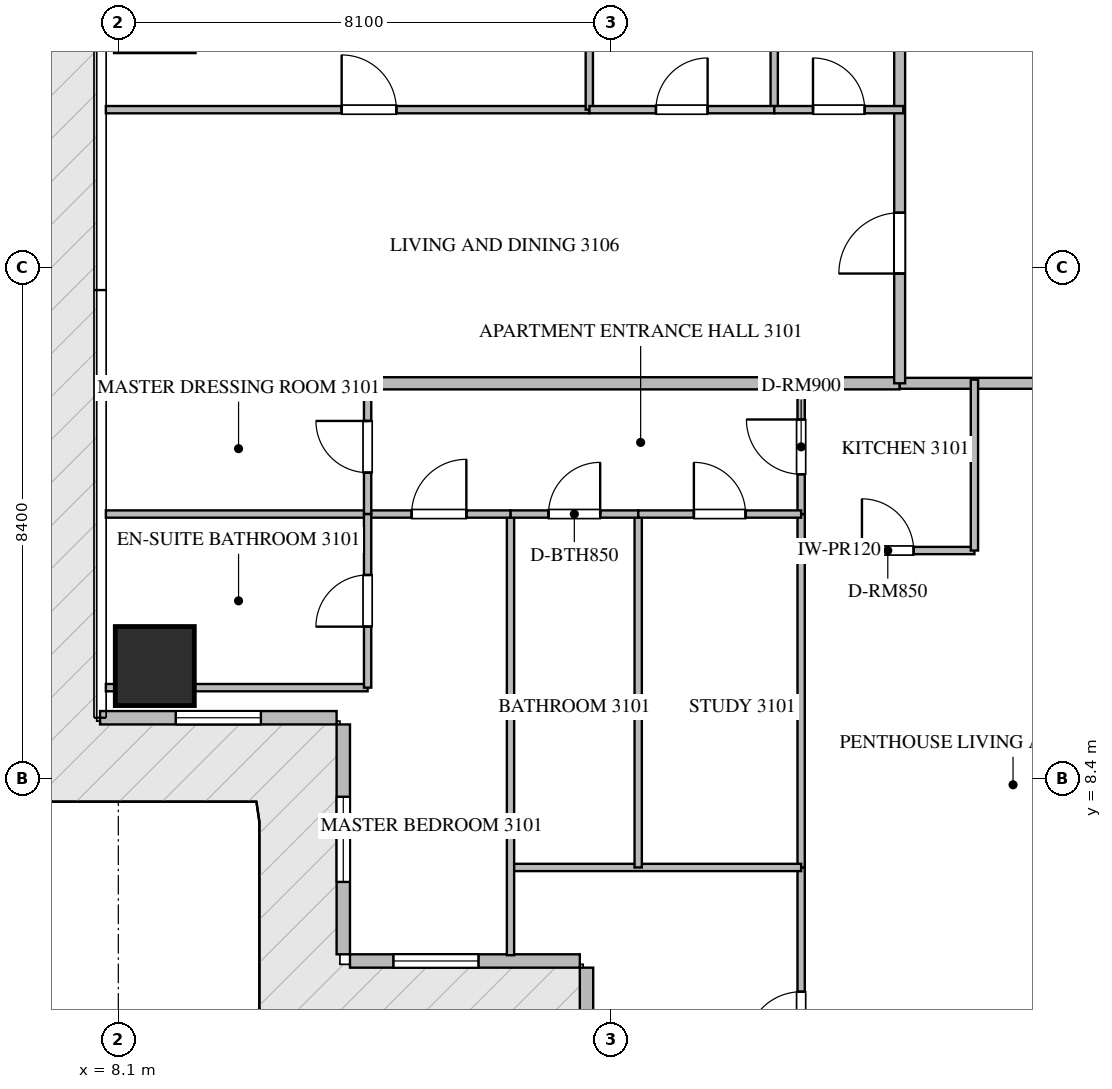
"""IFC4 building model, lengths in metres.
Left out: names, types, materials, properties, quantities, classifications, styles, units other than length and angle.
Written with IfcOpenShell. Run it as: python <this file> out.ifc"""

import sys

from ifc_helpers import new_model, si_unit, direction, frame, frame_2d, origin, origin_2d, place, context, subcontext, project, spatial, rectangle, extrude, source, transform, mapped, element, fill, save


model = new_model("IFC4")
c1 = context("Model", 3, precision=1e-05, world=origin(), true_north=direction((0.0, 1.0)))
c2 = subcontext(c1, "Body", "Model", "MODEL_VIEW")
j1 = project(units=[si_unit("LENGTHUNIT", "METRE"), si_unit("PLANEANGLEUNIT", "RADIAN")], contexts=[c1])
p1 = place(None, origin())
s1 = spatial("IfcSite", under=j1, at=p1, CompositionType="ELEMENT")
p2 = place(p1, origin())
s2 = spatial("IfcBuilding", under=s1, at=p2, CompositionType="ELEMENT")
p3 = place(p2, frame((0.0, 0.0, 127.65)))
s3 = spatial("IfcBuildingStorey", under=s2, at=p3, CompositionType="ELEMENT", Elevation=127.65)
m1 = source(origin(), c2, "Body", "SweptSolid", [
    extrude(rectangle(XDim=1.3, YDim=1.3, at=origin_2d()), origin(), (0.0, 0.0, 1.0), 3.75),
])
p4 = place(p3, frame((8.7, 10.25, -0.26), z_axis=(0.0, 0.0, 1.0), x_axis=(1.0, 0.0, 0.0)))
e1 = element("IfcColumn", 1, at=p4, inside=s3, PredefinedType="COLUMN", context=c2, shape_type="MappedRepresentation", body=[
    mapped(m1, transform((0.0, 0.0, 0.0), scale=1.0)),
])
p5 = place(p3, frame((7.8, 9.4, 0.0), z_axis=(0.0, 0.0, 1.0), x_axis=(1.0, 0.0, 0.0)))
e2 = element("IfcWall", 2, at=p5, inside=s3, PredefinedType="ELEMENTEDWALL", context=c2, shape_type="SweptSolid", body=[
    extrude(rectangle(XDim=3.89, YDim=0.22, at=frame_2d((1.945, 0.0))), origin(), (0.0, 0.0, 1.0), 3.475),
])
p6 = place(p5, frame((1.245, 0.0, 0.65)))
e3 = element("IfcOpeningElement", 3, at=p6, cuts=e2, PredefinedType="OPENING", context=c2, shape_type="SweptSolid", body=[
    extrude(rectangle(XDim=1.4, YDim=2.05, at=frame_2d((0.7, 1.025))), frame((0.0, 0.12, 0.0), z_axis=(0.0, -1.0, 0.0), x_axis=(1.0, 0.0, 0.0)), (0.0, 0.0, 1.0), 0.24),
])
p7 = place(p3, frame((11.8, 9.29, 0.0), z_axis=(0.0, 0.0, 1.0), x_axis=(0.0, -1.0, 0.0)))
e4 = element("IfcWall", 4, at=p7, inside=s3, PredefinedType="ELEMENTEDWALL", context=c2, shape_type="SweptSolid", body=[
    extrude(rectangle(XDim=3.78, YDim=0.22, at=frame_2d((1.89, 0.0))), origin(), (0.0, 0.0, 1.0), 3.475),
])
p8 = place(p7, frame((1.19, 0.0, 0.65)))
e5 = element("IfcOpeningElement", 5, at=p8, cuts=e4, PredefinedType="OPENING", context=c2, shape_type="SweptSolid", body=[
    extrude(rectangle(XDim=1.4, YDim=2.05, at=frame_2d((0.7, 1.025))), frame((0.0, 0.12, 0.0), z_axis=(0.0, -1.0, 0.0), x_axis=(1.0, 0.0, 0.0)), (0.0, 0.0, 1.0), 0.24),
])
p9 = place(p3, frame((11.91, 5.4, 0.0), z_axis=(0.0, 0.0, 1.0), x_axis=(1.0, 0.0, 0.0)))
e6 = element("IfcWall", 6, at=p9, inside=s3, PredefinedType="ELEMENTEDWALL", context=c2, shape_type="SweptSolid", body=[
    extrude(rectangle(XDim=3.78, YDim=0.22, at=frame_2d((1.89, 0.0))), origin(), (0.0, 0.0, 1.0), 3.475),
])
p10 = place(p9, frame((0.714, 0.0, 0.65)))
e7 = element("IfcOpeningElement", 7, at=p10, cuts=e6, PredefinedType="OPENING", context=c2, shape_type="SweptSolid", body=[
    extrude(rectangle(XDim=1.4, YDim=2.05, at=frame_2d((0.7, 1.025))), frame((0.0, 0.12, 0.0), z_axis=(0.0, -1.0, 0.0), x_axis=(1.0, 0.0, 0.0)), (0.0, 0.0, 1.0), 0.24),
])
p11 = place(p3, frame((15.8, 5.29, 0.0), z_axis=(0.0, 0.0, 1.0), x_axis=(0.0, -1.0, 0.0)))
e8 = element("IfcWall", 8, at=p11, inside=s3, PredefinedType="ELEMENTEDWALL", context=c2, shape_type="SweptSolid", body=[
    extrude(rectangle(XDim=3.89, YDim=0.22, at=frame_2d((1.945, 0.0))), origin(), (0.0, 0.0, 1.0), 3.475),
])
p12 = place(p11, frame((1.245, 0.0, 0.65)))
e9 = element("IfcOpeningElement", 9, at=p12, cuts=e8, PredefinedType="OPENING", context=c2, shape_type="SweptSolid", body=[
    extrude(rectangle(XDim=1.4, YDim=2.05, at=frame_2d((0.7, 1.025))), frame((0.0, 0.12, 0.0), z_axis=(0.0, -1.0, 0.0), x_axis=(1.0, 0.0, 0.0)), (0.0, 0.0, 1.0), 0.24),
])
p13 = place(p3, frame((7.882, 14.9, 0.0), z_axis=(0.0, 0.0, 1.0), x_axis=(1.0, 0.0, 0.0)))
e10 = element("IfcWall", 10, at=p13, inside=s3, PredefinedType="PARTITIONING", context=c2, shape_type="SweptSolid", body=[
    extrude(rectangle(XDim=13.068, YDim=0.2, at=frame_2d((6.534, 0.0))), origin(), (0.0, 0.0, 1.0), 3.49),
])
p14 = place(p3, frame((20.952, 14.9, 0.0), z_axis=(0.0, 0.0, 1.0), x_axis=(1.0, 0.0, 0.0)))
e11 = element("IfcWall", 11, at=p14, inside=s3, PredefinedType="PARTITIONING", context=c2, shape_type="SweptSolid", body=[
    extrude(rectangle(XDim=22.896, YDim=0.18, at=frame_2d((11.448, 0.0))), origin(), (0.0, 0.0, 1.0), 3.49),
])
p15 = place(p14, frame((2.781, 0.0, 0.0)))
e12 = element("IfcOpeningElement", 12, at=p15, cuts=e11, PredefinedType="OPENING", context=c2, shape_type="SweptSolid", body=[
    extrude(rectangle(XDim=1.0, YDim=2.15, at=frame_2d((0.5, 1.075))), frame((0.0, 0.1, 0.0), z_axis=(0.0, -1.0, 0.0), x_axis=(1.0, 0.0, 0.0)), (0.0, 0.0, 1.0), 0.2),
])
p16 = place(p14, frame((7.16, 0.0, 0.0)))
e13 = element("IfcOpeningElement", 13, at=p16, cuts=e11, PredefinedType="OPENING", context=c2, shape_type="SweptSolid", body=[
    extrude(rectangle(XDim=1.0, YDim=2.15, at=frame_2d((0.5, 1.075))), frame((0.0, 0.1, 0.0), z_axis=(0.0, -1.0, 0.0), x_axis=(1.0, 0.0, 0.0)), (0.0, 0.0, 1.0), 0.2),
])
p17 = place(p14, frame((19.115, 0.0, 0.0)))
e14 = element("IfcOpeningElement", 14, at=p17, cuts=e11, PredefinedType="OPENING", context=c2, shape_type="SweptSolid", body=[
    extrude(rectangle(XDim=1.0, YDim=2.15, at=frame_2d((0.5, 1.075))), frame((0.0, 0.1, 0.0), z_axis=(0.0, -1.0, 0.0), x_axis=(1.0, 0.0, 0.0)), (0.0, 0.0, 1.0), 0.2),
])
p18 = place(p3, frame((20.95, 14.9, 0.0), z_axis=(0.0, 0.0, 1.0), x_axis=(0.0, 1.0, 0.0)))
e15 = element("IfcWall", 15, at=p18, inside=s3, PredefinedType="PARTITIONING", context=c2, shape_type="SweptSolid", body=[
    extrude(rectangle(XDim=18.7, YDim=0.18, at=frame_2d((9.35, 0.0))), origin(), (0.0, 0.0, 1.0), 3.49),
])
p19 = place(p18, frame((1.805, 0.0, 0.0)))
e16 = element("IfcOpeningElement", 16, at=p19, cuts=e15, PredefinedType="OPENING", context=c2, shape_type="SweptSolid", body=[
    extrude(rectangle(XDim=1.0, YDim=2.15, at=frame_2d((0.5, 1.075))), frame((0.0, 0.1, 0.0), z_axis=(0.0, -1.0, 0.0), x_axis=(1.0, 0.0, 0.0)), (0.0, 0.0, 1.0), 0.2),
])
p20 = place(p18, frame((10.602, 0.0, 0.0)))
e17 = element("IfcOpeningElement", 17, at=p20, cuts=e15, PredefinedType="OPENING", context=c2, shape_type="SweptSolid", body=[
    extrude(rectangle(XDim=1.0, YDim=2.15, at=frame_2d((0.5, 1.075))), frame((0.0, 0.1, 0.0), z_axis=(0.0, -1.0, 0.0), x_axis=(1.0, 0.0, 0.0)), (0.0, 0.0, 1.0), 0.2),
])
p21 = place(p3, frame((19.33, 12.15, 0.0), z_axis=(0.0, 0.0, 1.0), x_axis=(1.0, 0.0, 0.0)))
e18 = element("IfcWall", 18, at=p21, inside=s3, PredefinedType="PARTITIONING", context=c2, shape_type="SweptSolid", body=[
    extrude(rectangle(XDim=2.85, YDim=0.12, at=frame_2d((1.425, 0.0))), origin(), (0.0, 0.0, 1.0), 3.49),
])
p22 = place(p21, frame((1.0, 0.0, 0.0)))
e19 = element("IfcOpeningElement", 19, at=p22, cuts=e18, PredefinedType="OPENING", context=c2, shape_type="SweptSolid", body=[
    extrude(rectangle(XDim=0.85, YDim=2.1, at=frame_2d((0.425, 1.05))), frame((0.0, 0.07, 0.0), z_axis=(0.0, -1.0, 0.0), x_axis=(1.0, 0.0, 0.0)), (0.0, 0.0, 1.0), 0.14),
])
p23 = place(p3, frame((22.18, 12.15, 0.0), z_axis=(0.0, 0.0, 1.0), x_axis=(0.0, 1.0, 0.0)))
e20 = element("IfcWall", 20, at=p23, inside=s3, PredefinedType="PARTITIONING", context=c2, shape_type="SweptSolid", body=[
    extrude(rectangle(XDim=2.81, YDim=0.12, at=frame_2d((1.405, 0.0))), origin(), (0.0, 0.0, 1.0), 3.49),
])
p24 = place(p3, frame((19.33, 12.75, 0.0), z_axis=(0.0, 0.0, 1.0), x_axis=(0.0, 1.0, 0.0)))
e21 = element("IfcWall", 21, at=p24, inside=s3, PredefinedType="PARTITIONING", context=c2, shape_type="SweptSolid", body=[
    extrude(rectangle(XDim=2.21, YDim=0.12, at=frame_2d((1.105, 0.0))), origin(), (0.0, 0.0, 1.0), 3.49),
])
p25 = place(p24, frame((0.655, 0.0, 0.0)))
e22 = element("IfcOpeningElement", 22, at=p25, cuts=e21, PredefinedType="OPENING", context=c2, shape_type="SweptSolid", body=[
    extrude(rectangle(XDim=0.9, YDim=2.1, at=frame_2d((0.45, 1.05))), frame((0.0, 0.07, 0.0), z_axis=(0.0, -1.0, 0.0), x_axis=(1.0, 0.0, 0.0)), (0.0, 0.0, 1.0), 0.14),
])
p26 = place(p3, frame((19.33, 1.495, 0.0), z_axis=(0.0, 0.0, 1.0), x_axis=(0.0, 1.0, 0.0)))
e23 = element("IfcWall", 23, at=p26, inside=s3, PredefinedType="PARTITIONING", context=c2, shape_type="SweptSolid", body=[
    extrude(rectangle(XDim=5.443, YDim=0.12, at=frame_2d((2.721, 0.0))), origin(), (0.0, 0.0, 1.0), 3.49),
])
p27 = place(p26, frame((2.499, 0.0, 0.0)))
e24 = element("IfcOpeningElement", 24, at=p27, cuts=e23, PredefinedType="OPENING", context=c2, shape_type="SweptSolid", body=[
    extrude(rectangle(XDim=0.9, YDim=2.1, at=frame_2d((0.45, 1.05))), frame((0.0, 0.07, 0.0), z_axis=(0.0, -1.0, 0.0), x_axis=(1.0, 0.0, 0.0)), (0.0, 0.0, 1.0), 0.14),
])
p28 = place(p3, frame((19.33, 6.94, 0.0), z_axis=(0.0, 0.0, 1.0), x_axis=(0.0, 1.0, 0.0)))
e25 = element("IfcWall", 25, at=p28, inside=s3, PredefinedType="PARTITIONING", context=c2, shape_type="SweptSolid", body=[
    extrude(rectangle(XDim=5.808, YDim=0.12, at=frame_2d((2.904, 0.0))), origin(), (0.0, 0.0, 1.0), 3.49),
])
p29 = place(p3, frame((14.55, 6.938, 0.0), z_axis=(0.0, 0.0, 1.0), x_axis=(1.0, 0.0, 0.0)))
e26 = element("IfcWall", 26, at=p29, inside=s3, PredefinedType="PARTITIONING", context=c2, shape_type="SweptSolid", body=[
    extrude(rectangle(XDim=4.78, YDim=0.12, at=frame_2d((2.39, 0.0))), origin(), (0.0, 0.0, 1.0), 3.49),
])
p30 = place(p3, frame((14.55, 5.495, 0.0), z_axis=(0.0, 0.0, 1.0), x_axis=(0.0, 1.0, 0.0)))
e27 = element("IfcWall", 27, at=p30, inside=s3, PredefinedType="PARTITIONING", context=c2, shape_type="SweptSolid", body=[
    extrude(rectangle(XDim=7.255, YDim=0.12, at=frame_2d((3.627, 0.0))), origin(), (0.0, 0.0, 1.0), 3.49),
])
p31 = place(p3, frame((16.65, 6.938, 0.0), z_axis=(0.0, 0.0, 1.0), x_axis=(0.0, 1.0, 0.0)))
e28 = element("IfcWall", 28, at=p31, inside=s3, PredefinedType="PARTITIONING", context=c2, shape_type="SweptSolid", body=[
    extrude(rectangle(XDim=5.812, YDim=0.12, at=frame_2d((2.906, 0.0))), origin(), (0.0, 0.0, 1.0), 2.972),
])
p32 = place(p3, frame((14.55, 12.75, 0.0), z_axis=(0.0, 0.0, 1.0), x_axis=(1.0, 0.0, 0.0)))
e29 = element("IfcWall", 29, at=p32, inside=s3, PredefinedType="PARTITIONING", context=c2, shape_type="SweptSolid", body=[
    extrude(rectangle(XDim=2.1, YDim=0.12, at=frame_2d((1.05, 0.0))), origin(), (0.0, 0.0, 1.0), 3.49),
])
p33 = place(p32, frame((0.625, 0.0, 0.0)))
e30 = element("IfcOpeningElement", 30, at=p33, cuts=e29, PredefinedType="OPENING", context=c2, shape_type="SweptSolid", body=[
    extrude(rectangle(XDim=0.85, YDim=2.1, at=frame_2d((0.425, 1.05))), frame((0.0, 0.07, 0.0), z_axis=(0.0, -1.0, 0.0), x_axis=(1.0, 0.0, 0.0)), (0.0, 0.0, 1.0), 0.14),
])
p34 = place(p3, frame((16.652, 12.75, 0.0), z_axis=(0.0, 0.0, 1.0), x_axis=(1.0, 0.0, 0.0)))
e31 = element("IfcWall", 31, at=p34, inside=s3, PredefinedType="PARTITIONING", context=c2, shape_type="SweptSolid", body=[
    extrude(rectangle(XDim=2.678, YDim=0.12, at=frame_2d((1.339, 0.0))), origin(), (0.0, 0.0, 1.0), 3.49),
])
p35 = place(p34, frame((0.914, 0.0, 0.0)))
e32 = element("IfcOpeningElement", 32, at=p35, cuts=e31, PredefinedType="OPENING", context=c2, shape_type="SweptSolid", body=[
    extrude(rectangle(XDim=0.85, YDim=2.1, at=frame_2d((0.425, 1.05))), frame((0.0, 0.07, 0.0), z_axis=(0.0, -1.0, 0.0), x_axis=(1.0, 0.0, 0.0)), (0.0, 0.0, 1.0), 0.14),
])
p36 = place(p3, frame((12.2, 12.75, 0.0), z_axis=(0.0, 0.0, 1.0), x_axis=(1.0, 0.0, 0.0)))
e33 = element("IfcWall", 33, at=p36, inside=s3, PredefinedType="PARTITIONING", context=c2, shape_type="SweptSolid", body=[
    extrude(rectangle(XDim=2.348, YDim=0.12, at=frame_2d((1.174, 0.0))), origin(), (0.0, 0.0, 1.0), 3.49),
])
p37 = place(p36, frame((0.724, 0.0, 0.0)))
e34 = element("IfcOpeningElement", 34, at=p37, cuts=e33, PredefinedType="OPENING", context=c2, shape_type="SweptSolid", body=[
    extrude(rectangle(XDim=0.9, YDim=2.1, at=frame_2d((0.45, 1.05))), frame((0.0, 0.07, 0.0), z_axis=(0.0, -1.0, 0.0), x_axis=(1.0, 0.0, 0.0)), (0.0, 0.0, 1.0), 0.14),
])
p38 = place(p3, frame((7.895, 9.895, 0.0), z_axis=(0.0, 0.0, 1.0), x_axis=(1.0, 0.0, 0.0)))
e35 = element("IfcWall", 35, at=p38, inside=s3, PredefinedType="PARTITIONING", context=c2, shape_type="SweptSolid", body=[
    extrude(rectangle(XDim=4.305, YDim=0.12, at=frame_2d((2.152, 0.0))), origin(), (0.0, 0.0, 1.0), 3.49),
])
p39 = place(p3, frame((7.895, 12.75, 0.0), z_axis=(0.0, 0.0, 1.0), x_axis=(1.0, 0.0, 0.0)))
e36 = element("IfcWall", 36, at=p39, inside=s3, PredefinedType="PARTITIONING", context=c2, shape_type="SweptSolid", body=[
    extrude(rectangle(XDim=4.303, YDim=0.12, at=frame_2d((2.151, 0.0))), origin(), (0.0, 0.0, 1.0), 3.49),
])
p40 = place(p3, frame((12.2, 9.895, 0.0), z_axis=(0.0, 0.0, 1.0), x_axis=(0.0, 1.0, 0.0)))
e37 = element("IfcWall", 37, at=p40, inside=s3, PredefinedType="PARTITIONING", context=c2, shape_type="SweptSolid", body=[
    extrude(rectangle(XDim=2.855, YDim=0.12, at=frame_2d((1.427, 0.0))), origin(), (0.0, 0.0, 1.0), 3.49),
])
p41 = place(p40, frame((1.003, 0.0, 0.0)))
e38 = element("IfcOpeningElement", 38, at=p41, cuts=e37, PredefinedType="OPENING", context=c2, shape_type="SweptSolid", body=[
    extrude(rectangle(XDim=0.85, YDim=2.1, at=frame_2d((0.425, 1.05))), frame((0.0, 0.07, 0.0), z_axis=(0.0, -1.0, 0.0), x_axis=(1.0, 0.0, 0.0)), (0.0, 0.0, 1.0), 0.14),
])
p42 = place(p3, frame((12.2, 12.752, 0.0), z_axis=(0.0, 0.0, 1.0), x_axis=(0.0, 1.0, 0.0)))
e39 = element("IfcWall", 39, at=p42, inside=s3, PredefinedType="PARTITIONING", context=c2, shape_type="SweptSolid", body=[
    extrude(rectangle(XDim=2.208, YDim=0.12, at=frame_2d((1.104, 0.0))), origin(), (0.0, 0.0, 1.0), 3.49),
])
p43 = place(p42, frame((0.679, 0.0, 0.0)))
e40 = element("IfcOpeningElement", 40, at=p43, cuts=e39, PredefinedType="OPENING", context=c2, shape_type="SweptSolid", body=[
    extrude(rectangle(XDim=0.85, YDim=2.1, at=frame_2d((0.425, 1.05))), frame((0.0, 0.07, 0.0), z_axis=(0.0, -1.0, 0.0), x_axis=(1.0, 0.0, 0.0)), (0.0, 0.0, 1.0), 0.14),
])
p44 = place(p3, frame((7.895, 19.4, 0.0), z_axis=(0.0, 0.0, 1.0), x_axis=(1.0, 0.0, 0.0)))
e41 = element("IfcWall", 41, at=p44, inside=s3, PredefinedType="PARTITIONING", context=c2, shape_type="SweptSolid", body=[
    extrude(rectangle(XDim=7.951, YDim=0.12, at=frame_2d((3.976, 0.0))), origin(), (0.0, 0.0, 1.0), 3.49),
])
p45 = place(p44, frame((3.878, 0.0, 0.0)))
e42 = element("IfcOpeningElement", 42, at=p45, cuts=e41, PredefinedType="OPENING", context=c2, shape_type="SweptSolid", body=[
    extrude(rectangle(XDim=0.9, YDim=2.1, at=frame_2d((0.45, 1.05))), frame((0.0, 0.07, 0.0), z_axis=(0.0, -1.0, 0.0), x_axis=(1.0, 0.0, 0.0)), (0.0, 0.0, 1.0), 0.14),
])
for number, where, z_axis, x_axis in (
    (43, (15.846, 19.4, 0.0), (0.0, 0.0, 1.0), (0.0, 1.0, 0.0)),
    (44, (18.887, 19.4, 0.0), (0.0, 0.0, 1.0), (0.0, 1.0, 0.0)),
):
    element("IfcWall", number, at=place(p3, frame(where, z_axis=z_axis, x_axis=x_axis)), inside=s3, PredefinedType="PARTITIONING", context=c2, shape_type="SweptSolid", body=[
        extrude(rectangle(XDim=4.86, YDim=0.12, at=frame_2d((2.43, 0.0))), origin(), (0.0, 0.0, 1.0), 3.49),
    ])
p46 = place(p3, frame((15.848, 19.4, 0.0), z_axis=(0.0, 0.0, 1.0), x_axis=(1.0, 0.0, 0.0)))
e45 = element("IfcWall", 45, at=p46, inside=s3, PredefinedType="PARTITIONING", context=c2, shape_type="SweptSolid", body=[
    extrude(rectangle(XDim=3.039, YDim=0.12, at=frame_2d((1.52, 0.0))), origin(), (0.0, 0.0, 1.0), 3.49),
])
p47 = place(p46, frame((1.094, 0.0, 0.0)))
e46 = element("IfcOpeningElement", 46, at=p47, cuts=e45, PredefinedType="OPENING", context=c2, shape_type="SweptSolid", body=[
    extrude(rectangle(XDim=0.85, YDim=2.1, at=frame_2d((0.425, 1.05))), frame((0.0, 0.07, 0.0), z_axis=(0.0, -1.0, 0.0), x_axis=(1.0, 0.0, 0.0)), (0.0, 0.0, 1.0), 0.14),
])
p48 = place(p3, frame((18.889, 19.4, 0.0), z_axis=(0.0, 0.0, 1.0), x_axis=(1.0, 0.0, 0.0)))
e47 = element("IfcWall", 47, at=p48, inside=s3, PredefinedType="PARTITIONING", context=c2, shape_type="SweptSolid", body=[
    extrude(rectangle(XDim=2.121, YDim=0.12, at=frame_2d((1.061, 0.0))), origin(), (0.0, 0.0, 1.0), 3.49),
])
p49 = place(p48, frame((0.636, 0.0, 0.0)))
e48 = element("IfcOpeningElement", 48, at=p49, cuts=e47, PredefinedType="OPENING", context=c2, shape_type="SweptSolid", body=[
    extrude(rectangle(XDim=0.85, YDim=2.1, at=frame_2d((0.425, 1.05))), frame((0.0, 0.07, 0.0), z_axis=(0.0, -1.0, 0.0), x_axis=(1.0, 0.0, 0.0)), (0.0, 0.0, 1.0), 0.14),
])
m2 = source(origin(), c2, "Body", "SweptSolid", [
    extrude(rectangle(XDim=1.4, YDim=2.05, at=frame_2d((0.7, 1.025))), frame((0.0, 0.03, 0.0), z_axis=(0.0, -1.0, 0.0), x_axis=(1.0, 0.0, 0.0)), (0.0, 0.0, 1.0), 0.06),
])
p50 = place(p6, origin())
e49 = element("IfcWindow", 49, at=p50, inside=s3, PartitioningType="SINGLE_PANEL", PredefinedType="WINDOW", context=c2, shape_type="MappedRepresentation", body=[
    mapped(m2, transform((0.0, 0.0, 0.0), scale=1.0)),
])
fill(e3, e49)
p51 = place(p8, origin())
e50 = element("IfcWindow", 50, at=p51, inside=s3, PartitioningType="SINGLE_PANEL", PredefinedType="WINDOW", context=c2, shape_type="MappedRepresentation", body=[
    mapped(m2, transform((0.0, 0.0, 0.0), scale=1.0)),
])
fill(e5, e50)
p52 = place(p10, origin())
e51 = element("IfcWindow", 51, at=p52, inside=s3, PartitioningType="SINGLE_PANEL", PredefinedType="WINDOW", context=c2, shape_type="MappedRepresentation", body=[
    mapped(m2, transform((0.0, 0.0, 0.0), scale=1.0)),
])
fill(e7, e51)
m3 = source(origin(), c2, "Body", "SweptSolid", [
    extrude(rectangle(XDim=1.0, YDim=2.15, at=frame_2d((0.5, 1.075))), frame((0.0, 0.025, 0.0), z_axis=(0.0, -1.0, 0.0), x_axis=(1.0, 0.0, 0.0)), (0.0, 0.0, 1.0), 0.05),
])
p53 = place(p19, origin())
e52 = element("IfcDoor", 52, at=p53, inside=s3, OperationType="SINGLE_SWING_LEFT", PredefinedType="DOOR", context=c2, shape_type="MappedRepresentation", body=[
    mapped(m3, transform((0.0, 0.0, 0.0), scale=1.0)),
])
fill(e16, e52)
m4 = source(origin(), c2, "Body", "SweptSolid", [
    extrude(rectangle(XDim=0.85, YDim=2.1, at=frame_2d((0.425, 1.05))), frame((0.0, 0.025, 0.0), z_axis=(0.0, -1.0, 0.0), x_axis=(1.0, 0.0, 0.0)), (0.0, 0.0, 1.0), 0.05),
])
p54 = place(p22, origin())
e53 = element("IfcDoor", 53, at=p54, inside=s3, OperationType="SINGLE_SWING_LEFT", PredefinedType="DOOR", context=c2, shape_type="MappedRepresentation", body=[
    mapped(m4, transform((0.0, 0.0, 0.0), scale=1.0)),
])
fill(e19, e53)
m5 = source(origin(), c2, "Body", "SweptSolid", [
    extrude(rectangle(XDim=0.9, YDim=2.1, at=frame_2d((0.45, 1.05))), frame((0.0, 0.025, 0.0), z_axis=(0.0, -1.0, 0.0), x_axis=(1.0, 0.0, 0.0)), (0.0, 0.0, 1.0), 0.05),
])
p55 = place(p25, origin())
e54 = element("IfcDoor", 54, at=p55, inside=s3, OperationType="SINGLE_SWING_RIGHT", PredefinedType="DOOR", context=c2, shape_type="MappedRepresentation", body=[
    mapped(m5, transform((0.0, 0.0, 0.0), scale=1.0)),
])
fill(e22, e54)
p56 = place(p27, origin())
e55 = element("IfcDoor", 55, at=p56, inside=s3, OperationType="SINGLE_SWING_LEFT", PredefinedType="DOOR", context=c2, shape_type="MappedRepresentation", body=[
    mapped(m5, transform((0.0, 0.0, 0.0), scale=1.0)),
])
fill(e24, e55)
p57 = place(p33, origin())
e56 = element("IfcDoor", 56, at=p57, inside=s3, OperationType="SINGLE_SWING_RIGHT", PredefinedType="DOOR", context=c2, shape_type="MappedRepresentation", body=[
    mapped(m4, transform((0.0, 0.0, 0.0), scale=1.0)),
])
fill(e30, e56)
p58 = place(p35, origin())
e57 = element("IfcDoor", 57, at=p58, inside=s3, OperationType="SINGLE_SWING_LEFT", PredefinedType="DOOR", context=c2, shape_type="MappedRepresentation", body=[
    mapped(m4, transform((0.0, 0.0, 0.0), scale=1.0)),
])
fill(e32, e57)
p59 = place(p37, origin())
e58 = element("IfcDoor", 58, at=p59, inside=s3, OperationType="SINGLE_SWING_RIGHT", PredefinedType="DOOR", context=c2, shape_type="MappedRepresentation", body=[
    mapped(m5, transform((0.0, 0.0, 0.0), scale=1.0)),
])
fill(e34, e58)
p60 = place(p41, origin())
e59 = element("IfcDoor", 59, at=p60, inside=s3, OperationType="SINGLE_SWING_LEFT", PredefinedType="DOOR", context=c2, shape_type="MappedRepresentation", body=[
    mapped(m4, transform((0.0, 0.0, 0.0), scale=1.0)),
])
fill(e38, e59)
p61 = place(p43, origin())
e60 = element("IfcDoor", 60, at=p61, inside=s3, OperationType="SINGLE_SWING_RIGHT", PredefinedType="DOOR", context=c2, shape_type="MappedRepresentation", body=[
    mapped(m4, transform((0.0, 0.0, 0.0), scale=1.0)),
])
fill(e40, e60)
p62 = place(p45, origin())
e61 = element("IfcDoor", 61, at=p62, inside=s3, OperationType="SINGLE_SWING_LEFT", PredefinedType="DOOR", context=c2, shape_type="MappedRepresentation", body=[
    mapped(m5, transform((0.0, 0.0, 0.0), scale=1.0)),
])
fill(e42, e61)
p63 = place(p47, origin())
e62 = element("IfcDoor", 62, at=p63, inside=s3, OperationType="SINGLE_SWING_RIGHT", PredefinedType="DOOR", context=c2, shape_type="MappedRepresentation", body=[
    mapped(m4, transform((0.0, 0.0, 0.0), scale=1.0)),
])
fill(e46, e62)
p64 = place(p49, origin())
e63 = element("IfcDoor", 63, at=p64, inside=s3, OperationType="SINGLE_SWING_LEFT", PredefinedType="DOOR", context=c2, shape_type="MappedRepresentation", body=[
    mapped(m4, transform((0.0, 0.0, 0.0), scale=1.0)),
])
fill(e48, e63)
save(model, sys.argv[1])
